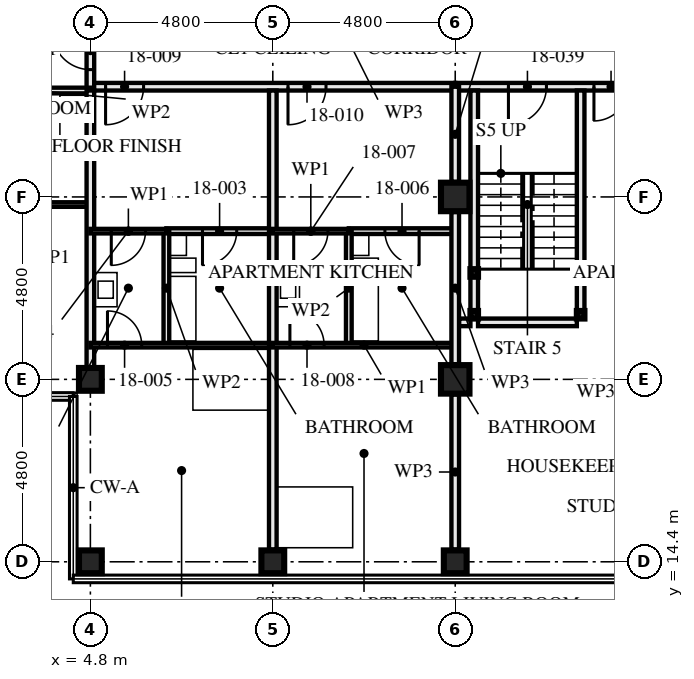
"""IFC4 building model, lengths in metres.
Left out: names, types, materials, properties, quantities, classifications, styles, units other than length and angle.
Written with IfcOpenShell. Run it as: python <this file> out.ifc"""

import sys

from ifc_helpers import new_model, si_unit, direction, frame, frame_2d, origin, origin_2d, place, context, subcontext, project, spatial, rectangle, hollow_rectangle, extrude, element, fill, save


model = new_model("IFC4")
c1 = context("Model", 3, precision=1e-05, world=origin(), true_north=direction((0.0, 1.0)))
c2 = subcontext(c1, "Body", "Model", "MODEL_VIEW")
j1 = project(units=[si_unit("LENGTHUNIT", "METRE"), si_unit("PLANEANGLEUNIT", "RADIAN")], contexts=[c1])
p1 = place(None, origin())
s1 = spatial("IfcSite", under=j1, at=p1, CompositionType="ELEMENT")
p2 = place(p1, origin())
s2 = spatial("IfcBuilding", under=s1, at=p2, CompositionType="ELEMENT")
p3 = place(p2, frame((0.0, 0.0, 69.0)))
s3 = spatial("IfcBuildingStorey", under=s2, at=p3, CompositionType="ELEMENT", Elevation=69.0)
for number, where, z_axis, x_axis in (
    (1, (4.8, 14.4, 0.0), (0.0, 0.0, 1.0), (0.0, 1.0, 0.0)),
    (2, (4.8, 19.2, 0.0), (0.0, 0.0, 1.0), (0.0, 1.0, 0.0)),
    (3, (9.6, 14.4, 0.0), (0.0, 0.0, 1.0), (0.0, 1.0, 0.0)),
    (4, (14.4, 14.4, 0.0), (0.0, 0.0, 1.0), (0.0, 1.0, 0.0)),
):
    element("IfcColumn", number, at=place(p3, frame(where, z_axis=z_axis, x_axis=x_axis)), inside=s3, PredefinedType="COLUMN", context=c2, shape_type="SweptSolid", body=[
        extrude(hollow_rectangle(XDim=0.6, YDim=0.6, WallThickness=0.08, at=origin_2d()), origin(), (0.0, 0.0, 1.0), 3.5),
    ])
for number, where, z_axis, x_axis in (
    (5, (14.4, 19.2, 0.0), (0.0, 0.0, 1.0), (1.0, 0.0, 0.0)),
    (6, (14.4, 24.0, 0.0), (0.0, 0.0, 1.0), (1.0, 0.0, 0.0)),
):
    element("IfcColumn", number, at=place(p3, frame(where, z_axis=z_axis, x_axis=x_axis)), inside=s3, PredefinedType="COLUMN", context=c2, shape_type="SweptSolid", body=[
        extrude(hollow_rectangle(XDim=0.75, YDim=0.75, WallThickness=0.08, at=origin_2d()), origin(), (0.0, 0.0, 1.0), 3.5),
    ])
for number, where, z_axis, x_axis in (
    (7, (14.9, 20.9, 0.0), (0.0, 0.0, 1.0), (1.0, 0.0, 0.0)),
    (8, (17.7, 20.9, 0.0), (0.0, 0.0, 1.0), (1.0, 0.0, 0.0)),
    (9, (14.9, 22.0, 0.0), (0.0, 0.0, 1.0), (1.0, 0.0, 0.0)),
    (10, (17.7, 22.0, 0.0), (0.0, 0.0, 1.0), (1.0, 0.0, 0.0)),
):
    element("IfcColumn", number, at=place(p3, frame(where, z_axis=z_axis, x_axis=x_axis)), inside=s3, PredefinedType="COLUMN", context=c2, shape_type="SweptSolid", body=[
        extrude(hollow_rectangle(XDim=0.2, YDim=0.2, WallThickness=0.008, at=origin_2d()), origin(), (0.0, 0.0, 1.0), 3.33),
    ])
p4 = place(p3, frame((2.0, 26.8, 0.0), z_axis=(0.0, 0.0, 1.0), x_axis=(1.0, 0.0, 0.0)))
e11 = element("IfcWall", 11, at=p4, inside=s3, PredefinedType="PARTITIONING", context=c2, shape_type="SweptSolid", body=[
    extrude(rectangle(XDim=2.8, YDim=0.15, at=frame_2d((1.4, 0.0))), origin(), (0.0, 0.0, 1.0), 3.33),
])
p5 = place(p3, frame((0.32, 23.8, 0.0), z_axis=(0.0, 0.0, 1.0), x_axis=(1.0, 0.0, 0.0)))
e12 = element("IfcWall", 12, at=p5, inside=s3, PredefinedType="PARTITIONING", context=c2, shape_type="SweptSolid", body=[
    extrude(rectangle(XDim=4.48, YDim=0.12, at=frame_2d((2.24, 0.0))), origin(), (0.0, 0.0, 1.0), 3.33),
])
p6 = place(p5, frame((0.605, 0.0, 0.0)))
e13 = element("IfcOpeningElement", 13, at=p6, cuts=e12, PredefinedType="OPENING", context=c2, shape_type="SweptSolid", body=[
    extrude(rectangle(XDim=0.9, YDim=2.1, at=frame_2d((0.45, 1.05))), frame((0.0, 0.071, 0.0), z_axis=(0.0, -1.0, 0.0), x_axis=(1.0, 0.0, 0.0)), (0.0, 0.0, 1.0), 0.141),
])
p7 = place(p3, frame((4.8, 19.52, 0.0), z_axis=(0.0, 0.0, 1.0), x_axis=(0.0, 1.0, 0.0)))
e14 = element("IfcWall", 14, at=p7, inside=s3, PredefinedType="PARTITIONING", context=c2, shape_type="SweptSolid", body=[
    extrude(rectangle(XDim=7.28, YDim=0.2, at=frame_2d((3.64, 0.0))), origin(), (0.0, 0.0, 1.0), 2.55),
])
p8 = place(p3, frame((6.8, 20.1, 0.0), z_axis=(0.0, 0.0, 1.0), x_axis=(0.0, 1.0, 0.0)))
e15 = element("IfcWall", 15, at=p8, inside=s3, PredefinedType="PARTITIONING", context=c2, shape_type="SweptSolid", body=[
    extrude(rectangle(XDim=3.0, YDim=0.15, at=frame_2d((1.5, 0.0))), origin(), (0.0, 0.0, 1.0), 3.33),
])
p9 = place(p3, frame((6.8, 23.1, 0.0), z_axis=(0.0, 0.0, 1.0), x_axis=(1.0, 0.0, 0.0)))
e16 = element("IfcWall", 16, at=p9, inside=s3, PredefinedType="PARTITIONING", context=c2, shape_type="SweptSolid", body=[
    extrude(rectangle(XDim=2.8, YDim=0.15, at=frame_2d((1.4, 0.0))), origin(), (0.0, 0.0, 1.0), 3.33),
])
p10 = place(p9, frame((0.95, 0.0, 0.0)))
e17 = element("IfcOpeningElement", 17, at=p10, cuts=e16, PredefinedType="OPENING", context=c2, shape_type="SweptSolid", body=[
    extrude(rectangle(XDim=0.9, YDim=2.1, at=frame_2d((0.45, 1.05))), frame((0.0, 0.085, 0.0), z_axis=(0.0, -1.0, 0.0), x_axis=(1.0, 0.0, 0.0)), (0.0, 0.0, 1.0), 0.171),
])
p11 = place(p3, frame((4.8, 23.1, 0.0), z_axis=(0.0, 0.0, 1.0), x_axis=(1.0, 0.0, 0.0)))
e18 = element("IfcWall", 18, at=p11, inside=s3, PredefinedType="PARTITIONING", context=c2, shape_type="SweptSolid", body=[
    extrude(rectangle(XDim=2.0, YDim=0.12, at=frame_2d((1.0, 0.0))), origin(), (0.0, 0.0, 1.0), 3.33),
])
p12 = place(p11, frame((0.55, 0.0, 0.0)))
e19 = element("IfcOpeningElement", 19, at=p12, cuts=e18, PredefinedType="OPENING", context=c2, shape_type="SweptSolid", body=[
    extrude(rectangle(XDim=0.9, YDim=2.1, at=frame_2d((0.45, 1.05))), frame((0.0, 0.071, 0.0), z_axis=(0.0, -1.0, 0.0), x_axis=(1.0, 0.0, 0.0)), (0.0, 0.0, 1.0), 0.141),
])
p13 = place(p3, frame((4.8, 20.1, 0.0), z_axis=(0.0, 0.0, 1.0), x_axis=(1.0, 0.0, 0.0)))
e20 = element("IfcWall", 20, at=p13, inside=s3, PredefinedType="PARTITIONING", context=c2, shape_type="SweptSolid", body=[
    extrude(rectangle(XDim=4.8, YDim=0.12, at=frame_2d((2.4, 0.0))), origin(), (0.0, 0.0, 1.0), 3.33),
])
p14 = place(p13, frame((0.45, 0.0, 0.0)))
e21 = element("IfcOpeningElement", 21, at=p14, cuts=e20, PredefinedType="OPENING", context=c2, shape_type="SweptSolid", body=[
    extrude(rectangle(XDim=0.9, YDim=2.1, at=frame_2d((0.45, 1.05))), frame((0.0, 0.071, 0.0), z_axis=(0.0, -1.0, 0.0), x_axis=(1.0, 0.0, 0.0)), (0.0, 0.0, 1.0), 0.141),
])
p15 = place(p3, frame((9.6, 14.72, 0.0), z_axis=(0.0, 0.0, 1.0), x_axis=(0.0, 1.0, 0.0)))
e22 = element("IfcWall", 22, at=p15, inside=s3, PredefinedType="PARTITIONING", context=c2, shape_type="SweptSolid", body=[
    extrude(rectangle(XDim=12.08, YDim=0.2, at=frame_2d((6.04, 0.0))), origin(), (0.0, 0.0, 1.0), 2.55),
])
p16 = place(p3, frame((11.6, 20.1, 0.0), z_axis=(0.0, 0.0, 1.0), x_axis=(0.0, 1.0, 0.0)))
e23 = element("IfcWall", 23, at=p16, inside=s3, PredefinedType="PARTITIONING", context=c2, shape_type="SweptSolid", body=[
    extrude(rectangle(XDim=3.0, YDim=0.15, at=frame_2d((1.5, 0.0))), origin(), (0.0, 0.0, 1.0), 3.33),
])
p17 = place(p3, frame((11.6, 23.1, 0.0), z_axis=(0.0, 0.0, 1.0), x_axis=(1.0, 0.0, 0.0)))
e24 = element("IfcWall", 24, at=p17, inside=s3, PredefinedType="PARTITIONING", context=c2, shape_type="SweptSolid", body=[
    extrude(rectangle(XDim=2.8, YDim=0.15, at=frame_2d((1.4, 0.0))), origin(), (0.0, 0.0, 1.0), 3.33),
])
p18 = place(p17, frame((0.95, 0.0, 0.0)))
e25 = element("IfcOpeningElement", 25, at=p18, cuts=e24, PredefinedType="OPENING", context=c2, shape_type="SweptSolid", body=[
    extrude(rectangle(XDim=0.9, YDim=2.1, at=frame_2d((0.45, 1.05))), frame((0.0, 0.085, 0.0), z_axis=(0.0, -1.0, 0.0), x_axis=(1.0, 0.0, 0.0)), (0.0, 0.0, 1.0), 0.171),
])
p19 = place(p3, frame((9.6, 23.1, 0.0), z_axis=(0.0, 0.0, 1.0), x_axis=(1.0, 0.0, 0.0)))
e26 = element("IfcWall", 26, at=p19, inside=s3, PredefinedType="PARTITIONING", context=c2, shape_type="SweptSolid", body=[
    extrude(rectangle(XDim=2.0, YDim=0.12, at=frame_2d((1.0, 0.0))), origin(), (0.0, 0.0, 1.0), 3.33),
])
p20 = place(p19, frame((0.55, 0.0, 0.0)))
e27 = element("IfcOpeningElement", 27, at=p20, cuts=e26, PredefinedType="OPENING", context=c2, shape_type="SweptSolid", body=[
    extrude(rectangle(XDim=0.9, YDim=2.1, at=frame_2d((0.45, 1.05))), frame((0.0, 0.071, 0.0), z_axis=(0.0, -1.0, 0.0), x_axis=(1.0, 0.0, 0.0)), (0.0, 0.0, 1.0), 0.141),
])
p21 = place(p3, frame((9.6, 20.1, 0.0), z_axis=(0.0, 0.0, 1.0), x_axis=(1.0, 0.0, 0.0)))
e28 = element("IfcWall", 28, at=p21, inside=s3, PredefinedType="PARTITIONING", context=c2, shape_type="SweptSolid", body=[
    extrude(rectangle(XDim=4.8, YDim=0.12, at=frame_2d((2.4, 0.0))), origin(), (0.0, 0.0, 1.0), 3.33),
])
p22 = place(p21, frame((0.45, 0.0, 0.0)))
e29 = element("IfcOpeningElement", 29, at=p22, cuts=e28, PredefinedType="OPENING", context=c2, shape_type="SweptSolid", body=[
    extrude(rectangle(XDim=0.9, YDim=2.1, at=frame_2d((0.45, 1.05))), frame((0.0, 0.071, 0.0), z_axis=(0.0, -1.0, 0.0), x_axis=(1.0, 0.0, 0.0)), (0.0, 0.0, 1.0), 0.141),
])
p23 = place(p3, frame((4.8, 26.9, 0.0), z_axis=(0.0, 0.0, 1.0), x_axis=(1.0, 0.0, 0.0)))
e30 = element("IfcWall", 30, at=p23, inside=s3, PredefinedType="PARTITIONING", context=c2, shape_type="SweptSolid", body=[
    extrude(rectangle(XDim=9.6, YDim=0.2, at=frame_2d((4.8, 0.0))), origin(), (0.0, 0.0, 1.0), 3.33),
])
p24 = place(p23, frame((0.4, 0.0, 0.0)))
e31 = element("IfcOpeningElement", 31, at=p24, cuts=e30, PredefinedType="OPENING", context=c2, shape_type="SweptSolid", body=[
    extrude(rectangle(XDim=1.0, YDim=2.1, at=frame_2d((0.5, 1.05))), frame((0.0, 0.111, 0.0), z_axis=(0.0, -1.0, 0.0), x_axis=(1.0, 0.0, 0.0)), (0.0, 0.0, 1.0), 0.221),
])
p25 = place(p23, frame((5.2, 0.0, 0.0)))
e32 = element("IfcOpeningElement", 32, at=p25, cuts=e30, PredefinedType="OPENING", context=c2, shape_type="SweptSolid", body=[
    extrude(rectangle(XDim=1.0, YDim=2.1, at=frame_2d((0.5, 1.05))), frame((0.0, 0.111, 0.0), z_axis=(0.0, -1.0, 0.0), x_axis=(1.0, 0.0, 0.0)), (0.0, 0.0, 1.0), 0.221),
])
p26 = place(p3, frame((4.8, 26.8, 0.0), z_axis=(0.0, 0.0, 1.0), x_axis=(0.0, 1.0, 0.0)))
e33 = element("IfcWall", 33, at=p26, inside=s3, PredefinedType="PARTITIONING", context=c2, shape_type="SweptSolid", body=[
    extrude(rectangle(XDim=1.605, YDim=0.2, at=frame_2d((0.802, 0.0))), origin(), (0.0, 0.0, 1.0), 3.33),
])
p27 = place(p26, frame((0.55, 0.0, 0.0)))
e34 = element("IfcOpeningElement", 34, at=p27, cuts=e33, PredefinedType="OPENING", context=c2, shape_type="SweptSolid", body=[
    extrude(rectangle(XDim=1.0, YDim=2.1, at=frame_2d((0.5, 1.05))), frame((0.0, 0.111, 0.0), z_axis=(0.0, -1.0, 0.0), x_axis=(1.0, 0.0, 0.0)), (0.0, 0.0, 1.0), 0.221),
])
p28 = place(p3, frame((14.9, 21.0, 0.0), z_axis=(0.0, 0.0, 1.0), x_axis=(0.0, 1.0, 0.0)))
e35 = element("IfcWall", 35, at=p28, inside=s3, PredefinedType="SOLIDWALL", context=c2, shape_type="SweptSolid", body=[
    extrude(rectangle(XDim=0.9, YDim=0.2, at=frame_2d((0.45, 0.0))), origin(), (0.0, 0.0, 1.0), 2.99),
])
p29 = place(p3, frame((14.9, 22.1, 0.0), z_axis=(0.0, 0.0, 1.0), x_axis=(0.0, 1.0, 0.0)))
e36 = element("IfcWall", 36, at=p29, inside=s3, PredefinedType="SOLIDWALL", context=c2, shape_type="SweptSolid", body=[
    extrude(rectangle(XDim=4.7, YDim=0.2, at=frame_2d((2.35, 0.0))), origin(), (0.0, 0.0, 1.0), 2.99),
])
p30 = place(p3, frame((17.7, 21.0, 0.0), z_axis=(0.0, 0.0, 1.0), x_axis=(0.0, 1.0, 0.0)))
e37 = element("IfcWall", 37, at=p30, inside=s3, PredefinedType="SOLIDWALL", context=c2, shape_type="SweptSolid", body=[
    extrude(rectangle(XDim=0.9, YDim=0.2, at=frame_2d((0.45, 0.0))), origin(), (0.0, 0.0, 1.0), 2.99),
])
p31 = place(p3, frame((17.7, 22.1, 0.0), z_axis=(0.0, 0.0, 1.0), x_axis=(0.0, 1.0, 0.0)))
e38 = element("IfcWall", 38, at=p31, inside=s3, PredefinedType="SOLIDWALL", context=c2, shape_type="SweptSolid", body=[
    extrude(rectangle(XDim=4.7, YDim=0.2, at=frame_2d((2.35, 0.0))), origin(), (0.0, 0.0, 1.0), 2.99),
])
p32 = place(p3, frame((14.5, 20.7, 0.0), z_axis=(0.0, 0.0, 1.0), x_axis=(1.0, 0.0, 0.0)))
e39 = element("IfcWall", 39, at=p32, inside=s3, PredefinedType="SOLIDWALL", context=c2, shape_type="SweptSolid", body=[
    extrude(rectangle(XDim=0.3, YDim=0.2, at=frame_2d((0.15, 0.0))), origin(), (0.0, 0.0, 1.0), 3.33),
])
p33 = place(p3, frame((15.0, 20.7, 0.0), z_axis=(0.0, 0.0, 1.0), x_axis=(1.0, 0.0, 0.0)))
e40 = element("IfcWall", 40, at=p33, inside=s3, PredefinedType="SOLIDWALL", context=c2, shape_type="SweptSolid", body=[
    extrude(rectangle(XDim=2.6, YDim=0.2, at=frame_2d((1.3, 0.0))), origin(), (0.0, 0.0, 1.0), 3.33),
])
p34 = place(p3, frame((14.4, 26.9, 0.0), z_axis=(0.0, 0.0, 1.0), x_axis=(1.0, 0.0, 0.0)))
e41 = element("IfcWall", 41, at=p34, inside=s3, PredefinedType="PARTITIONING", context=c2, shape_type="SweptSolid", body=[
    extrude(rectangle(XDim=14.4, YDim=0.2, at=frame_2d((7.2, 0.0))), origin(), (0.0, 0.0, 1.0), 2.55),
])
p35 = place(p34, frame((1.4, 0.0, 0.0)))
e42 = element("IfcOpeningElement", 42, at=p35, cuts=e41, PredefinedType="OPENING", context=c2, shape_type="SweptSolid", body=[
    extrude(rectangle(XDim=1.0, YDim=2.1, at=frame_2d((0.5, 1.05))), frame((0.0, 0.111, 0.0), z_axis=(0.0, -1.0, 0.0), x_axis=(1.0, 0.0, 0.0)), (0.0, 0.0, 1.0), 0.221),
])
p36 = place(p34, frame((3.65, 0.0, 0.0)))
e43 = element("IfcOpeningElement", 43, at=p36, cuts=e41, PredefinedType="OPENING", context=c2, shape_type="SweptSolid", body=[
    extrude(rectangle(XDim=0.9, YDim=2.1, at=frame_2d((0.45, 1.05))), frame((0.0, 0.111, 0.0), z_axis=(0.0, -1.0, 0.0), x_axis=(1.0, 0.0, 0.0)), (0.0, 0.0, 1.0), 0.221),
])
p37 = place(p34, frame((5.2, 0.0, 0.0)))
e44 = element("IfcOpeningElement", 44, at=p37, cuts=e41, PredefinedType="OPENING", context=c2, shape_type="SweptSolid", body=[
    extrude(rectangle(XDim=1.0, YDim=2.1, at=frame_2d((0.5, 1.05))), frame((0.0, 0.111, 0.0), z_axis=(0.0, -1.0, 0.0), x_axis=(1.0, 0.0, 0.0)), (0.0, 0.0, 1.0), 0.221),
])
p38 = place(p34, frame((10.0, 0.0, 0.0)))
e45 = element("IfcOpeningElement", 45, at=p38, cuts=e41, PredefinedType="OPENING", context=c2, shape_type="SweptSolid", body=[
    extrude(rectangle(XDim=1.0, YDim=2.1, at=frame_2d((0.5, 1.05))), frame((0.0, 0.111, 0.0), z_axis=(0.0, -1.0, 0.0), x_axis=(1.0, 0.0, 0.0)), (0.0, 0.0, 1.0), 0.221),
])
p39 = place(p3, frame((14.4, 14.72, 0.0), z_axis=(0.0, 0.0, 1.0), x_axis=(0.0, 1.0, 0.0)))
e46 = element("IfcWall", 46, at=p39, inside=s3, PredefinedType="PARTITIONING", context=c2, shape_type="SweptSolid", body=[
    extrude(rectangle(XDim=4.085, YDim=0.2, at=frame_2d((2.042, 0.0))), origin(), (0.0, 0.0, 1.0), 2.32),
])
p40 = place(p3, frame((14.4, 19.595, 0.0), z_axis=(0.0, 0.0, 1.0), x_axis=(0.0, 1.0, 0.0)))
e47 = element("IfcWall", 47, at=p40, inside=s3, PredefinedType="PARTITIONING", context=c2, shape_type="SweptSolid", body=[
    extrude(rectangle(XDim=4.01, YDim=0.2, at=frame_2d((2.005, 0.0))), origin(), (0.0, 0.0, 1.0), 2.32),
])
p41 = place(p3, frame((14.4, 24.395, 0.0), z_axis=(0.0, 0.0, 1.0), x_axis=(0.0, 1.0, 0.0)))
e48 = element("IfcWall", 48, at=p41, inside=s3, PredefinedType="PARTITIONING", context=c2, shape_type="SweptSolid", body=[
    extrude(rectangle(XDim=2.505, YDim=0.2, at=frame_2d((1.252, 0.0))), origin(), (0.0, 0.0, 1.0), 2.32),
])
p42 = place(p10, frame((0.9, 0.0, 0.0), z_axis=(0.0, 0.0, 1.0), x_axis=(-1.0, 0.0, 0.0)))
e49 = element("IfcDoor", 49, at=p42, inside=s3, OperationType="SINGLE_SWING_LEFT", PredefinedType="DOOR", context=c2, shape_type="SweptSolid", body=[
    extrude(rectangle(XDim=0.9, YDim=2.1, at=frame_2d((0.45, 1.05))), frame((0.0, 0.022, 0.0), z_axis=(0.0, -1.0, 0.0), x_axis=(1.0, 0.0, 0.0)), (0.0, 0.0, 1.0), 0.044),
])
fill(e17, e49)
p43 = place(p12, frame((0.9, 0.0, 0.0), z_axis=(0.0, 0.0, 1.0), x_axis=(-1.0, 0.0, 0.0)))
e50 = element("IfcDoor", 50, at=p43, inside=s3, OperationType="SINGLE_SWING_LEFT", PredefinedType="DOOR", context=c2, shape_type="SweptSolid", body=[
    extrude(rectangle(XDim=0.9, YDim=2.1, at=frame_2d((0.45, 1.05))), frame((0.0, 0.022, 0.0), z_axis=(0.0, -1.0, 0.0), x_axis=(1.0, 0.0, 0.0)), (0.0, 0.0, 1.0), 0.044),
])
fill(e19, e50)
p44 = place(p14, origin())
e51 = element("IfcDoor", 51, at=p44, inside=s3, OperationType="SINGLE_SWING_RIGHT", PredefinedType="DOOR", context=c2, shape_type="SweptSolid", body=[
    extrude(rectangle(XDim=0.9, YDim=2.1, at=frame_2d((0.45, 1.05))), frame((0.0, 0.022, 0.0), z_axis=(0.0, -1.0, 0.0), x_axis=(1.0, 0.0, 0.0)), (0.0, 0.0, 1.0), 0.044),
])
fill(e21, e51)
p45 = place(p18, frame((0.9, 0.0, 0.0), z_axis=(0.0, 0.0, 1.0), x_axis=(-1.0, 0.0, 0.0)))
e52 = element("IfcDoor", 52, at=p45, inside=s3, OperationType="SINGLE_SWING_RIGHT", PredefinedType="DOOR", context=c2, shape_type="SweptSolid", body=[
    extrude(rectangle(XDim=0.9, YDim=2.1, at=frame_2d((0.45, 1.05))), frame((0.0, 0.022, 0.0), z_axis=(0.0, -1.0, 0.0), x_axis=(1.0, 0.0, 0.0)), (0.0, 0.0, 1.0), 0.044),
])
fill(e25, e52)
p46 = place(p20, frame((0.9, 0.0, 0.0), z_axis=(0.0, 0.0, 1.0), x_axis=(-1.0, 0.0, 0.0)))
e53 = element("IfcDoor", 53, at=p46, inside=s3, OperationType="SINGLE_SWING_LEFT", PredefinedType="DOOR", context=c2, shape_type="SweptSolid", body=[
    extrude(rectangle(XDim=0.9, YDim=2.1, at=frame_2d((0.45, 1.05))), frame((0.0, 0.022, 0.0), z_axis=(0.0, -1.0, 0.0), x_axis=(1.0, 0.0, 0.0)), (0.0, 0.0, 1.0), 0.044),
])
fill(e27, e53)
p47 = place(p22, origin())
e54 = element("IfcDoor", 54, at=p47, inside=s3, OperationType="SINGLE_SWING_RIGHT", PredefinedType="DOOR", context=c2, shape_type="SweptSolid", body=[
    extrude(rectangle(XDim=0.9, YDim=2.1, at=frame_2d((0.45, 1.05))), frame((0.0, 0.022, 0.0), z_axis=(0.0, -1.0, 0.0), x_axis=(1.0, 0.0, 0.0)), (0.0, 0.0, 1.0), 0.044),
])
fill(e29, e54)
p48 = place(p24, frame((1.0, 0.0, 0.0), z_axis=(0.0, 0.0, 1.0), x_axis=(-1.0, 0.0, 0.0)))
e55 = element("IfcDoor", 55, at=p48, inside=s3, OperationType="SINGLE_SWING_LEFT", PredefinedType="DOOR", context=c2, shape_type="SweptSolid", body=[
    extrude(rectangle(XDim=1.0, YDim=2.1, at=frame_2d((0.5, 1.05))), frame((0.0, 0.027, 0.0), z_axis=(0.0, -1.0, 0.0), x_axis=(1.0, 0.0, 0.0)), (0.0, 0.0, 1.0), 0.054),
])
fill(e31, e55)
p49 = place(p25, frame((1.0, 0.0, 0.0), z_axis=(0.0, 0.0, 1.0), x_axis=(-1.0, 0.0, 0.0)))
e56 = element("IfcDoor", 56, at=p49, inside=s3, OperationType="SINGLE_SWING_LEFT", PredefinedType="DOOR", context=c2, shape_type="SweptSolid", body=[
    extrude(rectangle(XDim=1.0, YDim=2.1, at=frame_2d((0.5, 1.05))), frame((0.0, 0.027, 0.0), z_axis=(0.0, -1.0, 0.0), x_axis=(1.0, 0.0, 0.0)), (0.0, 0.0, 1.0), 0.054),
])
fill(e32, e56)
p50 = place(p27, origin())
e57 = element("IfcDoor", 57, at=p50, inside=s3, OperationType="SINGLE_SWING_LEFT", PredefinedType="DOOR", context=c2, shape_type="SweptSolid", body=[
    extrude(rectangle(XDim=1.0, YDim=2.1, at=frame_2d((0.5, 1.05))), frame((0.0, 0.027, 0.0), z_axis=(0.0, -1.0, 0.0), x_axis=(1.0, 0.0, 0.0)), (0.0, 0.0, 1.0), 0.054),
])
fill(e34, e57)
p51 = place(p35, frame((1.0, 0.0, 0.0), z_axis=(0.0, 0.0, 1.0), x_axis=(-1.0, 0.0, 0.0)))
e58 = element("IfcDoor", 58, at=p51, inside=s3, OperationType="SINGLE_SWING_LEFT", PredefinedType="DOOR", context=c2, shape_type="SweptSolid", body=[
    extrude(rectangle(XDim=1.0, YDim=2.1, at=frame_2d((0.5, 1.05))), frame((0.0, 0.032, 0.0), z_axis=(0.0, -1.0, 0.0), x_axis=(1.0, 0.0, 0.0)), (0.0, 0.0, 1.0), 0.064),
])
fill(e42, e58)
p52 = place(p36, frame((0.9, 0.0, 0.0), z_axis=(0.0, 0.0, 1.0), x_axis=(-1.0, 0.0, 0.0)))
e59 = element("IfcDoor", 59, at=p52, inside=s3, OperationType="SINGLE_SWING_LEFT", PredefinedType="DOOR", context=c2, shape_type="SweptSolid", body=[
    extrude(rectangle(XDim=0.9, YDim=2.1, at=frame_2d((0.45, 1.05))), frame((0.0, 0.027, 0.0), z_axis=(0.0, -1.0, 0.0), x_axis=(1.0, 0.0, 0.0)), (0.0, 0.0, 1.0), 0.054),
])
fill(e43, e59)
save(model, sys.argv[1])
